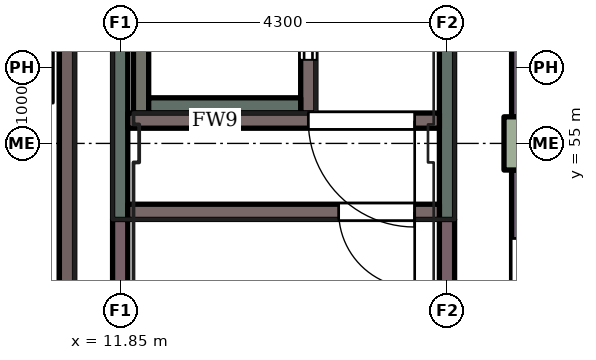
"""IFC4 building model, lengths in metres.
Left out: names, types, materials, properties, quantities, classifications, styles, units other than length and angle.
Written with IfcOpenShell. Run it as: python <this file> out.ifc"""

import sys

from ifc_helpers import new_model, si_unit, direction, frame, frame_2d, origin, origin_2d, place, context, subcontext, project, spatial, rectangle, extrude, element, fill, save


model = new_model("IFC4")
c1 = context("Model", 3, precision=1e-05, world=origin(), true_north=direction((0.0, 1.0)))
c2 = subcontext(c1, "Body", "Model", "MODEL_VIEW")
j1 = project(units=[si_unit("LENGTHUNIT", "METRE"), si_unit("PLANEANGLEUNIT", "RADIAN")], contexts=[c1])
p1 = place(None, origin())
s1 = spatial("IfcSite", under=j1, at=p1, CompositionType="ELEMENT")
p2 = place(p1, origin())
s2 = spatial("IfcBuilding", under=s1, at=p2, CompositionType="ELEMENT")
p3 = place(p2, frame((0.0, 0.0, 8.4)))
s3 = spatial("IfcBuildingStorey", under=s2, at=p3, CompositionType="ELEMENT", Elevation=8.4)
p4 = place(p3, frame((17.25, 55.0, 0.0), z_axis=(0.0, 0.0, 1.0), x_axis=(1.0, 0.0, 0.0)))
e1 = element("IfcColumn", 1, at=p4, inside=s3, PredefinedType="COLUMN", context=c2, shape_type="SweptSolid", body=[
    extrude(rectangle(XDim=0.7, YDim=0.7, at=origin_2d()), origin(), (0.0, 0.0, 1.0), 4.2),
])
p5 = place(p3, frame((17.25, 59.649, 0.0), z_axis=(0.0, 0.0, 1.0), x_axis=(0.0, -1.0, 0.0)))
e2 = element("IfcWall", 2, at=p5, inside=s3, PredefinedType="SHEAR", context=c2, shape_type="SweptSolid", body=[
    extrude(rectangle(XDim=4.299, YDim=0.5, at=frame_2d((2.149, 0.0))), origin(), (0.0, 0.0, 1.0), 3.4),
])
p6 = place(p5, frame((0.899, 0.0, 1.6)))
e3 = element("IfcOpeningElement", 3, at=p6, cuts=e2, PredefinedType="OPENING", context=c2, shape_type="SweptSolid", body=[
    extrude(rectangle(XDim=2.5, YDim=1.5, at=frame_2d((1.25, 0.75))), frame((0.0, 0.26, 0.0), z_axis=(0.0, -1.0, 0.0), x_axis=(1.0, 0.0, 0.0)), (0.0, 0.0, 1.0), 0.52),
])
p7 = place(p3, frame((17.25, 54.649, 0.0), z_axis=(0.0, 0.0, 1.0), x_axis=(0.0, -1.0, 0.0)))
e4 = element("IfcWall", 4, at=p7, inside=s3, PredefinedType="SHEAR", context=c2, shape_type="SweptSolid", body=[
    extrude(rectangle(XDim=4.299, YDim=0.5, at=frame_2d((2.149, 0.0))), origin(), (0.0, 0.0, 1.0), 3.4),
])
p8 = place(p7, frame((0.899, 0.0, 1.6)))
e5 = element("IfcOpeningElement", 5, at=p8, cuts=e4, PredefinedType="OPENING", context=c2, shape_type="SweptSolid", body=[
    extrude(rectangle(XDim=2.5, YDim=1.5, at=frame_2d((1.25, 0.75))), frame((0.0, 0.26, 0.0), z_axis=(0.0, -1.0, 0.0), x_axis=(1.0, 0.0, 0.0)), (0.0, 0.0, 1.0), 0.52),
])
p9 = place(p3, frame((11.15, 43.0, 0.25), z_axis=(0.0, 0.0, 1.0), x_axis=(0.0, 1.0, 0.0)))
e6 = element("IfcWall", 6, at=p9, inside=s3, PredefinedType="PARAPET", context=c2, shape_type="SweptSolid", body=[
    extrude(rectangle(XDim=14.0, YDim=0.2, at=frame_2d((7.0, 0.0))), origin(), (0.0, 0.0, 1.0), 0.45),
])
p10 = place(p3, frame((11.15, 42.6, 3.6), z_axis=(0.0, 0.0, 1.0), x_axis=(0.0, 1.0, 0.0)))
e7 = element("IfcWall", 7, at=p10, inside=s3, PredefinedType="PARAPET", context=c2, shape_type="SweptSolid", body=[
    extrude(rectangle(XDim=14.8, YDim=0.2, at=frame_2d((7.4, 0.0))), origin(), (0.0, 0.0, 1.0), 0.45),
])
for number, where, z_axis, x_axis in (
    (8, (11.85, 54.0, 0.0), (0.0, 0.0, 1.0), (0.0, -1.0, 0.0)),
    (9, (16.15, 54.0, 0.0), (0.0, 0.0, 1.0), (0.0, -1.0, 0.0)),
):
    element("IfcWall", number, at=place(p3, frame(where, z_axis=z_axis, x_axis=x_axis)), inside=s3, PredefinedType="PARAPET", context=c2, shape_type="SweptSolid", body=[
        extrude(rectangle(XDim=3.986, YDim=0.2, at=frame_2d((1.993, 0.0))), origin(), (0.0, 0.0, 1.0), 1.1),
    ])
p11 = place(p3, frame((14.325, 57.8, 0.0), z_axis=(0.0, 0.0, 1.0), x_axis=(0.0, -1.0, 0.0)))
e10 = element("IfcWall", 10, at=p11, inside=s3, PredefinedType="SHEAR", context=c2, shape_type="SweptSolid", body=[
    extrude(rectangle(XDim=2.4, YDim=0.2, at=frame_2d((1.2, 0.0))), origin(), (0.0, 0.0, 1.0), 3.0),
])
p12 = place(p11, frame((0.7, 0.0, 0.0)))
e11 = element("IfcOpeningElement", 11, at=p12, cuts=e10, PredefinedType="OPENING", context=c2, shape_type="SweptSolid", body=[
    extrude(rectangle(XDim=1.0, YDim=2.1, at=frame_2d((0.5, 1.05))), frame((0.0, 0.11, 0.0), z_axis=(0.0, -1.0, 0.0), x_axis=(1.0, 0.0, 0.0)), (0.0, 0.0, 1.0), 0.22),
])
p13 = place(p3, frame((12.125, 57.8, 0.0), z_axis=(0.0, 0.0, 1.0), x_axis=(0.0, -1.0, 0.0)))
e12 = element("IfcWall", 12, at=p13, inside=s3, PredefinedType="SHEAR", context=c2, shape_type="SweptSolid", body=[
    extrude(rectangle(XDim=2.4, YDim=0.2, at=frame_2d((1.2, 0.0))), origin(), (0.0, 0.0, 1.0), 3.0),
])
p14 = place(p3, frame((14.225, 55.5, 0.0), z_axis=(0.0, 0.0, 1.0), x_axis=(-1.0, 0.0, 0.0)))
e13 = element("IfcWall", 13, at=p14, inside=s3, PredefinedType="SHEAR", context=c2, shape_type="SweptSolid", body=[
    extrude(rectangle(XDim=2.0, YDim=0.2, at=frame_2d((1.0, 0.0))), origin(), (0.0, 0.0, 1.0), 3.0),
])
for number, where, z_axis, x_axis in (
    (14, (16.15, 65.0, 0.0), (0.0, 0.0, 1.0), (0.0, -1.0, 0.0)),
    (15, (11.85, 65.0, 0.0), (0.0, 0.0, 1.0), (0.0, -1.0, 0.0)),
):
    element("IfcWall", number, at=place(p3, frame(where, z_axis=z_axis, x_axis=x_axis)), inside=s3, PredefinedType="STANDARD", context=c2, shape_type="SweptSolid", body=[
        extrude(rectangle(XDim=11.0, YDim=0.2, at=frame_2d((5.5, 0.0))), origin(), (0.0, 0.0, 1.0), 2.74),
    ])
p15 = place(p3, frame((16.05, 54.1, 0.0), z_axis=(0.0, 0.0, 1.0), x_axis=(-1.0, 0.0, 0.0)))
e16 = element("IfcWall", 16, at=p15, inside=s3, PredefinedType="STANDARD", context=c2, shape_type="SweptSolid", body=[
    extrude(rectangle(XDim=4.1, YDim=0.2, at=frame_2d((2.05, 0.0))), origin(), (0.0, 0.0, 1.0), 2.74),
])
p16 = place(p15, frame((0.325, 0.0, 0.0)))
e17 = element("IfcOpeningElement", 17, at=p16, cuts=e16, PredefinedType="OPENING", context=c2, shape_type="SweptSolid", body=[
    extrude(rectangle(XDim=1.0, YDim=2.1, at=frame_2d((0.5, 1.05))), frame((0.0, 0.11, 0.0), z_axis=(0.0, -1.0, 0.0), x_axis=(1.0, 0.0, 0.0)), (0.0, 0.0, 1.0), 0.22),
])
p17 = place(p3, frame((16.05, 55.3, 0.0), z_axis=(0.0, 0.0, 1.0), x_axis=(-1.0, 0.0, 0.0)))
e18 = element("IfcWall", 18, at=p17, inside=s3, PredefinedType="STANDARD", context=c2, shape_type="SweptSolid", body=[
    extrude(rectangle(XDim=4.1, YDim=0.2, at=frame_2d((2.05, 0.0))), origin(), (0.0, 0.0, 1.0), 2.74),
])
p18 = place(p17, frame((0.325, 0.0, 0.0)))
e19 = element("IfcOpeningElement", 19, at=p18, cuts=e18, PredefinedType="OPENING", context=c2, shape_type="SweptSolid", body=[
    extrude(rectangle(XDim=1.4, YDim=2.4, at=frame_2d((0.7, 1.2))), frame((0.0, 0.11, 0.0), z_axis=(0.0, -1.0, 0.0), x_axis=(1.0, 0.0, 0.0)), (0.0, 0.0, 1.0), 0.22),
])
p19 = place(p12, origin())
e20 = element("IfcDoor", 20, at=p19, inside=s3, OperationType="SLIDING_TO_LEFT", PredefinedType="DOOR", context=c2, shape_type="SweptSolid", body=[
    extrude(rectangle(XDim=1.0, YDim=2.1, at=frame_2d((0.5, 1.05))), frame((0.0, 0.025, 0.0), z_axis=(0.0, -1.0, 0.0), x_axis=(1.0, 0.0, 0.0)), (0.0, 0.0, 1.0), 0.05),
])
fill(e11, e20)
p20 = place(p16, origin())
e21 = element("IfcDoor", 21, at=p20, inside=s3, OperationType="SINGLE_SWING_LEFT", PredefinedType="DOOR", context=c2, shape_type="SweptSolid", body=[
    extrude(rectangle(XDim=1.0, YDim=2.1, at=frame_2d((0.5, 1.05))), frame((0.0, 0.025, 0.0), z_axis=(0.0, -1.0, 0.0), x_axis=(1.0, 0.0, 0.0)), (0.0, 0.0, 1.0), 0.05),
])
fill(e17, e21)
p21 = place(p18, origin())
e22 = element("IfcDoor", 22, at=p21, inside=s3, OperationType="DOUBLE_DOOR_SINGLE_SWING", PredefinedType="DOOR", context=c2, shape_type="SweptSolid", body=[
    extrude(rectangle(XDim=1.4, YDim=2.4, at=frame_2d((0.7, 1.2))), frame((0.0, 0.025, 0.0), z_axis=(0.0, -1.0, 0.0), x_axis=(1.0, 0.0, 0.0)), (0.0, 0.0, 1.0), 0.05),
])
fill(e19, e22)
save(model, sys.argv[1])
